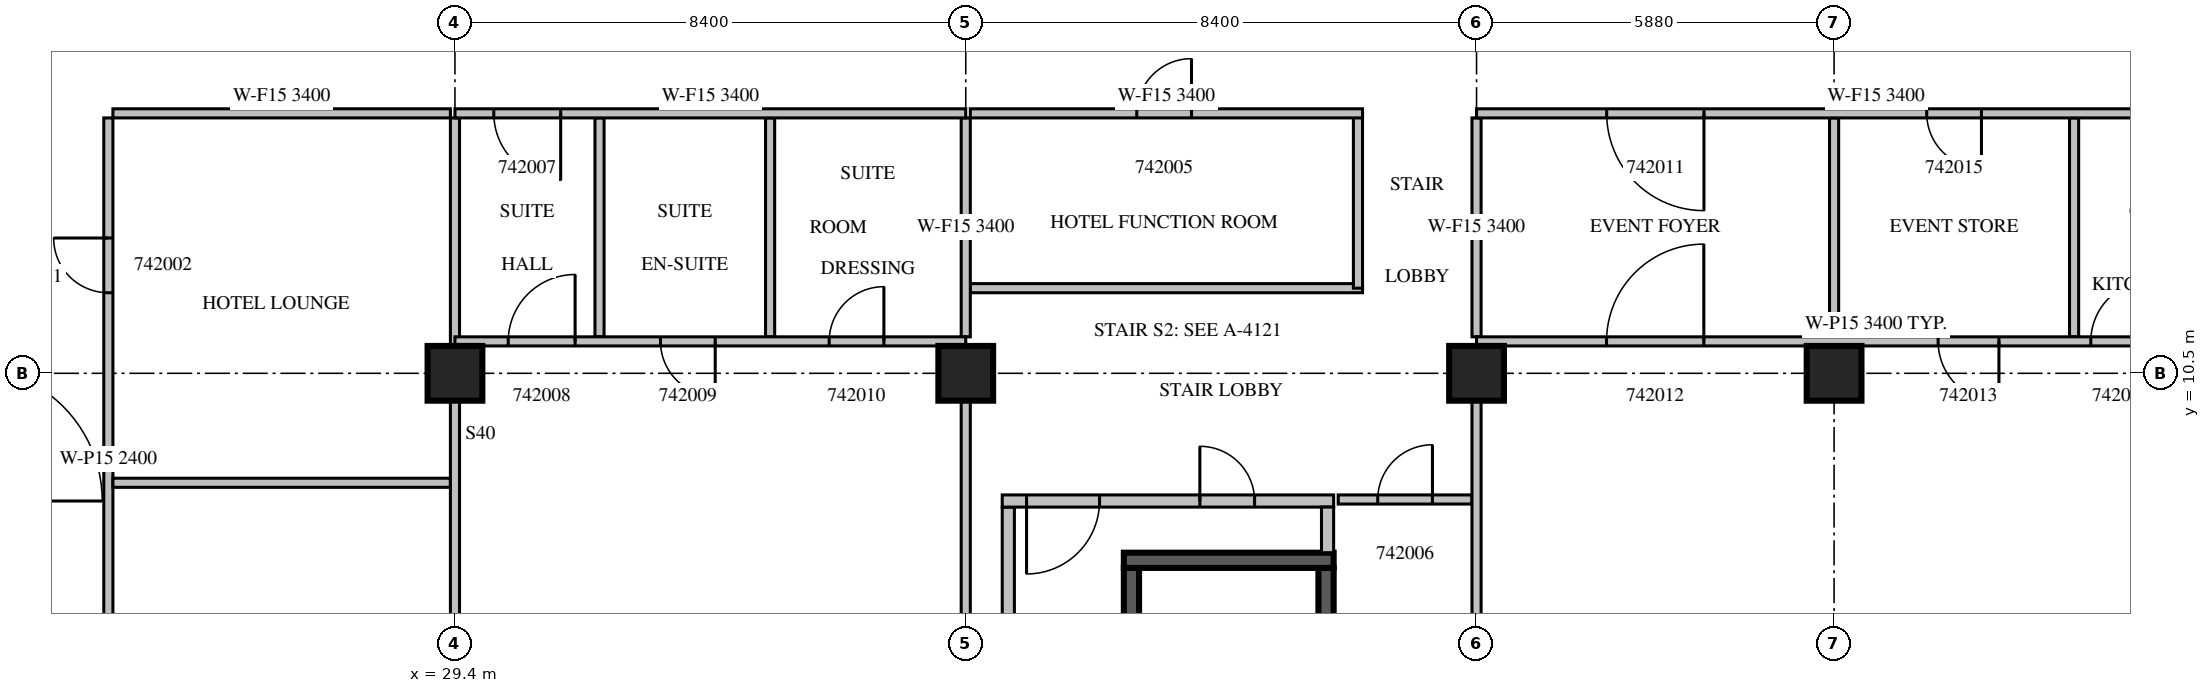
"""IFC4 building model, lengths in metres.
Left out: names, types, materials, properties, quantities, classifications, styles, units other than length and angle.
Written with IfcOpenShell. Run it as: python <this file> out.ifc"""

import sys

from ifc_helpers import new_model, si_unit, direction, frame, frame_2d, origin, origin_2d, place, context, subcontext, project, spatial, rectangle, extrude, source, transform, mapped, element, fill, save


model = new_model("IFC4")
c1 = context("Model", 3, precision=1e-05, world=origin(), true_north=direction((0.0, 1.0)))
c2 = subcontext(c1, "Body", "Model", "MODEL_VIEW")
j1 = project(units=[si_unit("LENGTHUNIT", "METRE"), si_unit("PLANEANGLEUNIT", "RADIAN")], contexts=[c1])
p1 = place(None, origin())
s1 = spatial("IfcSite", under=j1, at=p1, CompositionType="ELEMENT")
p2 = place(p1, origin())
s2 = spatial("IfcBuilding", under=s1, at=p2, CompositionType="ELEMENT")
p3 = place(p2, frame((0.0, 0.0, 193.0)))
s3 = spatial("IfcBuildingStorey", under=s2, at=p3, CompositionType="ELEMENT", Elevation=193.0)
m1 = source(origin(), c2, "Body", "SweptSolid", [
    extrude(rectangle(XDim=0.9, YDim=0.9, at=origin_2d()), origin(), (0.0, 0.0, 1.0), 3.8),
])
for number, where, z_axis, x_axis in (
    (1, (29.4, 10.5, 0.0), (0.0, 0.0, 1.0), (1.0, 0.0, 0.0)),
    (2, (37.8, 10.5, 0.0), (0.0, 0.0, 1.0), (1.0, 0.0, 0.0)),
    (3, (46.2, 10.5, 0.0), (0.0, 0.0, 1.0), (1.0, 0.0, 0.0)),
    (4, (52.08, 10.5, 0.0), (0.0, 0.0, 1.0), (1.0, 0.0, 0.0)),
):
    element("IfcColumn", number, at=place(p3, frame(where, z_axis=z_axis, x_axis=x_axis)), inside=s3, PredefinedType="COLUMN", context=c2, shape_type="MappedRepresentation", body=[
        mapped(m1, transform((0.0, 0.0, 0.0), scale=1.0)),
    ])
m2 = source(origin(), c2, "Body", "SweptSolid", [
    extrude(rectangle(XDim=7.0, YDim=0.25, at=frame_2d((3.5, 0.0))), origin(), (0.0, 0.0, 1.0), 3.4),
])
p4 = place(p3, frame((40.525, 0.3, 0.0), z_axis=(0.0, 0.0, 1.0), x_axis=(0.0, 1.0, 0.0)))
e5 = element("IfcWall", 5, at=p4, inside=s3, PredefinedType="SOLIDWALL", context=c2, shape_type="MappedRepresentation", body=[
    mapped(m2, transform((0.0, 0.0, 0.0), scale=1.0)),
])
m3 = source(origin(), c2, "Body", "SweptSolid", [
    extrude(rectangle(XDim=1.1, YDim=2.1, at=frame_2d((0.55, 1.05))), frame((0.0, 0.135, 0.0), z_axis=(0.0, -1.0, 0.0), x_axis=(1.0, 0.0, 0.0)), (0.0, 0.0, 1.0), 0.27),
])
p5 = place(p4, frame((0.55, 0.0, 0.0)))
e6 = element("IfcOpeningElement", 6, at=p5, cuts=e5, PredefinedType="OPENING", context=c2, shape_type="MappedRepresentation", body=[
    mapped(m3, transform((0.0, 0.0, 0.0), scale=1.0)),
])
p6 = place(p3, frame((43.725, 0.3, 0.0), z_axis=(0.0, 0.0, 1.0), x_axis=(0.0, 1.0, 0.0)))
e7 = element("IfcWall", 7, at=p6, inside=s3, PredefinedType="SOLIDWALL", context=c2, shape_type="MappedRepresentation", body=[
    mapped(m2, transform((0.0, 0.0, 0.0), scale=1.0)),
])
m4 = source(origin(), c2, "Body", "SweptSolid", [
    extrude(rectangle(XDim=3.45, YDim=0.25, at=frame_2d((1.725, 0.0))), origin(), (0.0, 0.0, 1.0), 3.4),
])
p7 = place(p3, frame((40.4, 7.425, 0.0), z_axis=(0.0, 0.0, 1.0), x_axis=(1.0, 0.0, 0.0)))
e8 = element("IfcWall", 8, at=p7, inside=s3, PredefinedType="SOLIDWALL", context=c2, shape_type="MappedRepresentation", body=[
    mapped(m4, transform((0.0, 0.0, 0.0), scale=1.0)),
])
m5 = source(origin(), c2, "Body", "SweptSolid", [
    extrude(rectangle(XDim=8.0, YDim=0.2, at=frame_2d((4.0, 0.0))), origin(), (0.0, 0.0, 1.0), 3.4),
])
p8 = place(p3, frame((38.5, 0.3, 0.0), z_axis=(0.0, 0.0, 1.0), x_axis=(0.0, 1.0, 0.0)))
e9 = element("IfcWall", 9, at=p8, inside=s3, PredefinedType="PARTITIONING", context=c2, shape_type="MappedRepresentation", body=[
    mapped(m5, transform((0.0, 0.0, 0.0), scale=1.0)),
])
m6 = source(origin(), c2, "Body", "SweptSolid", [
    extrude(rectangle(XDim=5.45, YDim=0.2, at=frame_2d((2.725, 0.0))), origin(), (0.0, 0.0, 1.0), 3.4),
])
p9 = place(p3, frame((38.4, 8.4, 0.0), z_axis=(0.0, 0.0, 1.0), x_axis=(1.0, 0.0, 0.0)))
e10 = element("IfcWall", 10, at=p9, inside=s3, PredefinedType="PARTITIONING", context=c2, shape_type="MappedRepresentation", body=[
    mapped(m6, transform((0.0, 0.0, 0.0), scale=1.0)),
])
m7 = source(origin(), c2, "Body", "SweptSolid", [
    extrude(rectangle(XDim=1.2, YDim=2.1, at=frame_2d((0.6, 1.05))), frame((0.0, 0.11, 0.0), z_axis=(0.0, -1.0, 0.0), x_axis=(1.0, 0.0, 0.0)), (0.0, 0.0, 1.0), 0.22),
])
p10 = place(p9, frame((0.4, 0.0, 0.0)))
e11 = element("IfcOpeningElement", 11, at=p10, cuts=e10, PredefinedType="OPENING", context=c2, shape_type="MappedRepresentation", body=[
    mapped(m7, transform((0.0, 0.0, 0.0), scale=1.0)),
])
m8 = source(origin(), c2, "Body", "SweptSolid", [
    extrude(rectangle(XDim=0.9, YDim=2.1, at=frame_2d((0.45, 1.05))), frame((0.0, 0.11, 0.0), z_axis=(0.0, -1.0, 0.0), x_axis=(1.0, 0.0, 0.0)), (0.0, 0.0, 1.0), 0.22),
])
p11 = place(p9, frame((3.25, 0.0, 0.0)))
e12 = element("IfcOpeningElement", 12, at=p11, cuts=e10, PredefinedType="OPENING", context=c2, shape_type="MappedRepresentation", body=[
    mapped(m8, transform((0.0, 0.0, 0.0), scale=1.0)),
])
m9 = source(origin(), c2, "Body", "SweptSolid", [
    extrude(rectangle(XDim=0.75, YDim=0.2, at=frame_2d((0.375, 0.0))), origin(), (0.0, 0.0, 1.0), 3.4),
])
p12 = place(p3, frame((43.75, 7.55, 0.0), z_axis=(0.0, 0.0, 1.0), x_axis=(0.0, 1.0, 0.0)))
e13 = element("IfcWall", 13, at=p12, inside=s3, PredefinedType="PARTITIONING", context=c2, shape_type="MappedRepresentation", body=[
    mapped(m9, transform((0.0, 0.0, 0.0), scale=1.0)),
])
p13 = place(p3, frame((23.7, 14.7, 0.0), z_axis=(0.0, 0.0, 1.0), x_axis=(0.0, -1.0, 0.0)))
e14 = element("IfcWall", 14, at=p13, inside=s3, PredefinedType="PARTITIONING", context=c2, shape_type="SweptSolid", body=[
    extrude(rectangle(XDim=11.225, YDim=0.15, at=frame_2d((5.612, 0.0))), origin(), (0.0, 0.0, 1.0), 2.4),
])
m10 = source(origin(), c2, "Body", "SweptSolid", [
    extrude(rectangle(XDim=0.9, YDim=2.1, at=frame_2d((0.45, 1.05))), frame((0.0, 0.085, 0.0), z_axis=(0.0, -1.0, 0.0), x_axis=(1.0, 0.0, 0.0)), (0.0, 0.0, 1.0), 0.17),
])
p14 = place(p13, frame((8.463, 0.0, 0.0)))
e15 = element("IfcOpeningElement", 15, at=p14, cuts=e14, PredefinedType="OPENING", context=c2, shape_type="MappedRepresentation", body=[
    mapped(m10, transform((0.0, 0.0, 0.0), scale=1.0)),
])
p15 = place(p13, frame((1.975, 0.0, 0.0)))
e16 = element("IfcOpeningElement", 16, at=p15, cuts=e14, PredefinedType="OPENING", context=c2, shape_type="MappedRepresentation", body=[
    mapped(m10, transform((0.0, 0.0, 0.0), scale=1.0)),
])
m11 = source(origin(), c2, "Body", "SweptSolid", [
    extrude(rectangle(XDim=5.55, YDim=0.15, at=frame_2d((2.775, 0.0))), origin(), (0.0, 0.0, 1.0), 3.4),
])
for number, where, z_axis, x_axis in (
    (17, (29.325, 8.7, 0.0), (0.0, 0.0, 1.0), (-1.0, 0.0, 0.0)),
    (18, (29.325, 14.775, 0.0), (0.0, 0.0, 1.0), (-1.0, 0.0, 0.0)),
):
    element("IfcWall", number, at=place(p3, frame(where, z_axis=z_axis, x_axis=x_axis)), inside=s3, PredefinedType="PARTITIONING", context=c2, shape_type="MappedRepresentation", body=[
        mapped(m11, transform((0.0, 0.0, 0.0), scale=1.0)),
    ])
m12 = source(origin(), c2, "Body", "SweptSolid", [
    extrude(rectangle(XDim=6.576, YDim=0.15, at=frame_2d((3.288, 0.0))), origin(), (0.0, 0.0, 1.0), 3.4),
])
p16 = place(p3, frame((29.4, 3.475, 0.0), z_axis=(0.0, 0.0, 1.0), x_axis=(0.0, 1.0, 0.0)))
e19 = element("IfcWall", 19, at=p16, inside=s3, PredefinedType="PARTITIONING", context=c2, shape_type="MappedRepresentation", body=[
    mapped(m12, transform((0.0, 0.0, 0.0), scale=1.0)),
])
p17 = place(p3, frame((29.4, 10.949, 0.0), z_axis=(0.0, 0.0, 1.0), x_axis=(0.0, 1.0, 0.0)))
e20 = element("IfcWall", 20, at=p17, inside=s3, PredefinedType="PARTITIONING", context=c2, shape_type="SweptSolid", body=[
    extrude(rectangle(XDim=3.751, YDim=0.15, at=frame_2d((1.875, 0.0))), origin(), (0.0, 0.0, 1.0), 3.4),
])
m13 = source(origin(), c2, "Body", "SweptSolid", [
    extrude(rectangle(XDim=6.45, YDim=0.15, at=frame_2d((3.225, 0.0))), origin(), (0.0, 0.0, 1.0), 3.4),
])
p18 = place(p3, frame((37.875, 11.9, 0.0), z_axis=(0.0, 0.0, 1.0), x_axis=(1.0, 0.0, 0.0)))
e21 = element("IfcWall", 21, at=p18, inside=s3, PredefinedType="PARTITIONING", context=c2, shape_type="MappedRepresentation", body=[
    mapped(m13, transform((0.0, 0.0, 0.0), scale=1.0)),
])
p19 = place(p3, frame((44.25, 11.9, 0.0), z_axis=(0.0, 0.0, 1.0), x_axis=(0.0, 1.0, 0.0)))
e22 = element("IfcWall", 22, at=p19, inside=s3, PredefinedType="PARTITIONING", context=c2, shape_type="SweptSolid", body=[
    extrude(rectangle(XDim=2.875, YDim=0.15, at=frame_2d((1.438, 0.0))), origin(), (0.0, 0.0, 1.0), 3.4),
])
p20 = place(p3, frame((44.325, 14.775, 0.0), z_axis=(0.0, 0.0, 1.0), x_axis=(-1.0, 0.0, 0.0)))
e23 = element("IfcWall", 23, at=p20, inside=s3, PredefinedType="PARTITIONING", context=c2, shape_type="MappedRepresentation", body=[
    mapped(m13, transform((0.0, 0.0, 0.0), scale=1.0)),
])
p21 = place(p20, frame((2.812, 0.0, 0.0)))
e24 = element("IfcOpeningElement", 24, at=p21, cuts=e23, PredefinedType="OPENING", context=c2, shape_type="MappedRepresentation", body=[
    mapped(m10, transform((0.0, 0.0, 0.0), scale=1.0)),
])
m14 = source(origin(), c2, "Body", "SweptSolid", [
    extrude(rectangle(XDim=2.2, YDim=0.15, at=frame_2d((1.1, 0.0))), origin(), (0.0, 0.0, 1.0), 3.4),
])
p22 = place(p3, frame((46.125, 8.425, 0.0), z_axis=(0.0, 0.0, 1.0), x_axis=(-1.0, 0.0, 0.0)))
e25 = element("IfcWall", 25, at=p22, inside=s3, PredefinedType="PARTITIONING", context=c2, shape_type="MappedRepresentation", body=[
    mapped(m14, transform((0.0, 0.0, 0.0), scale=1.0)),
])
p23 = place(p22, frame((0.65, 0.0, 0.0)))
e26 = element("IfcOpeningElement", 26, at=p23, cuts=e25, PredefinedType="OPENING", context=c2, shape_type="MappedRepresentation", body=[
    mapped(m10, transform((0.0, 0.0, 0.0), scale=1.0)),
])
m15 = source(origin(), c2, "Body", "SweptSolid", [
    extrude(rectangle(XDim=3.6, YDim=0.15, at=frame_2d((1.8, 0.0))), origin(), (0.0, 0.0, 1.0), 3.4),
])
for number, where, z_axis, x_axis in (
    (27, (31.777, 11.1, 0.0), (0.0, 0.0, 1.0), (0.0, 1.0, 0.0)),
    (28, (34.583, 11.1, 0.0), (0.0, 0.0, 1.0), (0.0, 1.0, 0.0)),
):
    element("IfcWall", number, at=place(p3, frame(where, z_axis=z_axis, x_axis=x_axis)), inside=s3, PredefinedType="PARTITIONING", context=c2, shape_type="MappedRepresentation", body=[
        mapped(m15, transform((0.0, 0.0, 0.0), scale=1.0)),
    ])
m16 = source(origin(), c2, "Body", "SweptSolid", [
    extrude(rectangle(XDim=9.152, YDim=0.15, at=frame_2d((4.576, 0.0))), origin(), (0.0, 0.0, 1.0), 3.4),
])
p24 = place(p3, frame((37.8, 0.899, 0.0), z_axis=(0.0, 0.0, 1.0), x_axis=(0.0, 1.0, 0.0)))
e29 = element("IfcWall", 29, at=p24, inside=s3, PredefinedType="PARTITIONING", context=c2, shape_type="MappedRepresentation", body=[
    mapped(m16, transform((0.0, 0.0, 0.0), scale=1.0)),
])
p25 = place(p3, frame((37.8, 11.1, 0.0), z_axis=(0.0, 0.0, 1.0), x_axis=(0.0, 1.0, 0.0)))
e30 = element("IfcWall", 30, at=p25, inside=s3, PredefinedType="PARTITIONING", context=c2, shape_type="MappedRepresentation", body=[
    mapped(m15, transform((0.0, 0.0, 0.0), scale=1.0)),
])
m17 = source(origin(), c2, "Body", "SweptSolid", [
    extrude(rectangle(XDim=8.4, YDim=0.15, at=frame_2d((4.2, 0.0))), origin(), (0.0, 0.0, 1.0), 3.4),
])
p26 = place(p3, frame((37.8, 11.025, 0.0), z_axis=(0.0, 0.0, 1.0), x_axis=(-1.0, 0.0, 0.0)))
e31 = element("IfcWall", 31, at=p26, inside=s3, PredefinedType="PARTITIONING", context=c2, shape_type="MappedRepresentation", body=[
    mapped(m17, transform((0.0, 0.0, 0.0), scale=1.0)),
])
m18 = source(origin(), c2, "Body", "SweptSolid", [
    extrude(rectangle(XDim=1.1, YDim=2.1, at=frame_2d((0.55, 1.05))), frame((0.0, 0.085, 0.0), z_axis=(0.0, -1.0, 0.0), x_axis=(1.0, 0.0, 0.0)), (0.0, 0.0, 1.0), 0.17),
])
p27 = place(p26, frame((6.424, 0.0, 0.0)))
e32 = element("IfcOpeningElement", 32, at=p27, cuts=e31, PredefinedType="OPENING", context=c2, shape_type="MappedRepresentation", body=[
    mapped(m18, transform((0.0, 0.0, 0.0), scale=1.0)),
])
p28 = place(p26, frame((4.12, 0.0, 0.0)))
e33 = element("IfcOpeningElement", 33, at=p28, cuts=e31, PredefinedType="OPENING", context=c2, shape_type="MappedRepresentation", body=[
    mapped(m10, transform((0.0, 0.0, 0.0), scale=1.0)),
])
p29 = place(p26, frame((1.346, 0.0, 0.0)))
e34 = element("IfcOpeningElement", 34, at=p29, cuts=e31, PredefinedType="OPENING", context=c2, shape_type="MappedRepresentation", body=[
    mapped(m10, transform((0.0, 0.0, 0.0), scale=1.0)),
])
for number, where, z_axis, x_axis in (
    (35, (52.08, 11.1, 0.0), (0.0, 0.0, 1.0), (0.0, 1.0, 0.0)),
    (36, (56.027, 11.1, 0.0), (0.0, 0.0, 1.0), (0.0, 1.0, 0.0)),
):
    element("IfcWall", number, at=place(p3, frame(where, z_axis=z_axis, x_axis=x_axis)), inside=s3, PredefinedType="PARTITIONING", context=c2, shape_type="MappedRepresentation", body=[
        mapped(m15, transform((0.0, 0.0, 0.0), scale=1.0)),
    ])
p30 = place(p3, frame((46.2, 0.899, 0.0), z_axis=(0.0, 0.0, 1.0), x_axis=(0.0, 1.0, 0.0)))
e37 = element("IfcWall", 37, at=p30, inside=s3, PredefinedType="PARTITIONING", context=c2, shape_type="MappedRepresentation", body=[
    mapped(m16, transform((0.0, 0.0, 0.0), scale=1.0)),
])
p31 = place(p3, frame((46.2, 11.1, 0.0), z_axis=(0.0, 0.0, 1.0), x_axis=(0.0, 1.0, 0.0)))
e38 = element("IfcWall", 38, at=p31, inside=s3, PredefinedType="PARTITIONING", context=c2, shape_type="MappedRepresentation", body=[
    mapped(m15, transform((0.0, 0.0, 0.0), scale=1.0)),
])
m19 = source(origin(), c2, "Body", "SweptSolid", [
    extrude(rectangle(XDim=13.14, YDim=0.15, at=frame_2d((6.57, 0.0))), origin(), (0.0, 0.0, 1.0), 3.4),
])
p32 = place(p3, frame((59.34, 11.025, 0.0), z_axis=(0.0, 0.0, 1.0), x_axis=(-1.0, 0.0, 0.0)))
e39 = element("IfcWall", 39, at=p32, inside=s3, PredefinedType="PARTITIONING", context=c2, shape_type="MappedRepresentation", body=[
    mapped(m19, transform((0.0, 0.0, 0.0), scale=1.0)),
])
m20 = source(origin(), c2, "Body", "SweptSolid", [
    extrude(rectangle(XDim=1.6, YDim=2.1, at=frame_2d((0.8, 1.05))), frame((0.0, 0.085, 0.0), z_axis=(0.0, -1.0, 0.0), x_axis=(1.0, 0.0, 0.0)), (0.0, 0.0, 1.0), 0.17),
])
p33 = place(p32, frame((9.402, 0.0, 0.0)))
e40 = element("IfcOpeningElement", 40, at=p33, cuts=e39, PredefinedType="OPENING", context=c2, shape_type="MappedRepresentation", body=[
    mapped(m20, transform((0.0, 0.0, 0.0), scale=1.0)),
])
m21 = source(origin(), c2, "Body", "SweptSolid", [
    extrude(rectangle(XDim=1.0, YDim=2.1, at=frame_2d((0.5, 1.05))), frame((0.0, 0.085, 0.0), z_axis=(0.0, -1.0, 0.0), x_axis=(1.0, 0.0, 0.0)), (0.0, 0.0, 1.0), 0.17),
])
p34 = place(p32, frame((4.549, 0.0, 0.0)))
e41 = element("IfcOpeningElement", 41, at=p34, cuts=e39, PredefinedType="OPENING", context=c2, shape_type="MappedRepresentation", body=[
    mapped(m21, transform((0.0, 0.0, 0.0), scale=1.0)),
])
p35 = place(p32, frame((2.038, 0.0, 0.0)))
e42 = element("IfcOpeningElement", 42, at=p35, cuts=e39, PredefinedType="OPENING", context=c2, shape_type="MappedRepresentation", body=[
    mapped(m21, transform((0.0, 0.0, 0.0), scale=1.0)),
])
p36 = place(p3, frame((37.8, 14.775, 0.0), z_axis=(0.0, 0.0, 1.0), x_axis=(-1.0, 0.0, 0.0)))
e43 = element("IfcWall", 43, at=p36, inside=s3, PredefinedType="PARTITIONING", context=c2, shape_type="MappedRepresentation", body=[
    mapped(m17, transform((0.0, 0.0, 0.0), scale=1.0)),
])
p37 = place(p36, frame((6.662, 0.0, 0.0)))
e44 = element("IfcOpeningElement", 44, at=p37, cuts=e43, PredefinedType="OPENING", context=c2, shape_type="MappedRepresentation", body=[
    mapped(m18, transform((0.0, 0.0, 0.0), scale=1.0)),
])
p38 = place(p3, frame((59.34, 14.775, 0.0), z_axis=(0.0, 0.0, 1.0), x_axis=(-1.0, 0.0, 0.0)))
e45 = element("IfcWall", 45, at=p38, inside=s3, PredefinedType="PARTITIONING", context=c2, shape_type="MappedRepresentation", body=[
    mapped(m19, transform((0.0, 0.0, 0.0), scale=1.0)),
])
p39 = place(p38, frame((9.4, 0.0, 0.0)))
e46 = element("IfcOpeningElement", 46, at=p39, cuts=e45, PredefinedType="OPENING", context=c2, shape_type="MappedRepresentation", body=[
    mapped(m20, transform((0.0, 0.0, 0.0), scale=1.0)),
])
p40 = place(p38, frame((4.837, 0.0, 0.0)))
e47 = element("IfcOpeningElement", 47, at=p40, cuts=e45, PredefinedType="OPENING", context=c2, shape_type="MappedRepresentation", body=[
    mapped(m10, transform((0.0, 0.0, 0.0), scale=1.0)),
])
m22 = source(origin(), c2, "Body", "SweptSolid", [
    extrude(rectangle(XDim=1.2, YDim=2.1, at=frame_2d((0.6, 1.05))), frame((0.0, 0.025, 0.0), z_axis=(0.0, -1.0, 0.0), x_axis=(1.0, 0.0, 0.0)), (0.0, 0.0, 1.0), 0.05),
])
p41 = place(p10, origin())
e48 = element("IfcDoor", 48, at=p41, inside=s3, OperationType="SINGLE_SWING_RIGHT", PredefinedType="DOOR", context=c2, shape_type="MappedRepresentation", body=[
    mapped(m22, transform((0.0, 0.0, 0.0), scale=1.0)),
])
fill(e11, e48)
m23 = source(origin(), c2, "Body", "SweptSolid", [
    extrude(rectangle(XDim=0.9, YDim=2.1, at=frame_2d((0.45, 1.05))), frame((0.0, 0.025, 0.0), z_axis=(0.0, -1.0, 0.0), x_axis=(1.0, 0.0, 0.0)), (0.0, 0.0, 1.0), 0.05),
])
p42 = place(p11, origin())
e49 = element("IfcDoor", 49, at=p42, inside=s3, OperationType="SINGLE_SWING_LEFT", PredefinedType="DOOR", context=c2, shape_type="MappedRepresentation", body=[
    mapped(m23, transform((0.0, 0.0, 0.0), scale=1.0)),
])
fill(e12, e49)
p43 = place(p15, origin())
e50 = element("IfcDoor", 50, at=p43, inside=s3, OperationType="SINGLE_SWING_RIGHT", PredefinedType="DOOR", context=c2, shape_type="MappedRepresentation", body=[
    mapped(m23, transform((0.0, 0.0, 0.0), scale=1.0)),
])
fill(e16, e50)
p44 = place(p21, origin())
e51 = element("IfcDoor", 51, at=p44, inside=s3, OperationType="SINGLE_SWING_RIGHT", PredefinedType="DOOR", context=c2, shape_type="MappedRepresentation", body=[
    mapped(m23, transform((0.0, 0.0, 0.0), scale=1.0)),
])
fill(e24, e51)
p45 = place(p23, origin())
e52 = element("IfcDoor", 52, at=p45, inside=s3, OperationType="SINGLE_SWING_RIGHT", PredefinedType="DOOR", context=c2, shape_type="MappedRepresentation", body=[
    mapped(m23, transform((0.0, 0.0, 0.0), scale=1.0)),
])
fill(e26, e52)
m24 = source(origin(), c2, "Body", "SweptSolid", [
    extrude(rectangle(XDim=1.1, YDim=2.1, at=frame_2d((0.55, 1.05))), frame((0.0, 0.025, 0.0), z_axis=(0.0, -1.0, 0.0), x_axis=(1.0, 0.0, 0.0)), (0.0, 0.0, 1.0), 0.05),
])
p46 = place(p37, origin())
e53 = element("IfcDoor", 53, at=p46, inside=s3, OperationType="SINGLE_SWING_LEFT", PredefinedType="DOOR", context=c2, shape_type="MappedRepresentation", body=[
    mapped(m24, transform((0.0, 0.0, 0.0), scale=1.0)),
])
fill(e44, e53)
p47 = place(p27, origin())
e54 = element("IfcDoor", 54, at=p47, inside=s3, OperationType="SINGLE_SWING_RIGHT", PredefinedType="DOOR", context=c2, shape_type="MappedRepresentation", body=[
    mapped(m24, transform((0.0, 0.0, 0.0), scale=1.0)),
])
fill(e32, e54)
p48 = place(p28, origin())
e55 = element("IfcDoor", 55, at=p48, inside=s3, OperationType="SINGLE_SWING_LEFT", PredefinedType="DOOR", context=c2, shape_type="MappedRepresentation", body=[
    mapped(m23, transform((0.0, 0.0, 0.0), scale=1.0)),
])
fill(e33, e55)
p49 = place(p29, origin())
e56 = element("IfcDoor", 56, at=p49, inside=s3, OperationType="SINGLE_SWING_RIGHT", PredefinedType="DOOR", context=c2, shape_type="MappedRepresentation", body=[
    mapped(m23, transform((0.0, 0.0, 0.0), scale=1.0)),
])
fill(e34, e56)
m25 = source(origin(), c2, "Body", "SweptSolid", [
    extrude(rectangle(XDim=1.6, YDim=2.1, at=frame_2d((0.8, 1.05))), frame((0.0, 0.025, 0.0), z_axis=(0.0, -1.0, 0.0), x_axis=(1.0, 0.0, 0.0)), (0.0, 0.0, 1.0), 0.05),
])
p50 = place(p39, origin())
e57 = element("IfcDoor", 57, at=p50, inside=s3, OperationType="SINGLE_SWING_LEFT", PredefinedType="DOOR", context=c2, shape_type="MappedRepresentation", body=[
    mapped(m25, transform((0.0, 0.0, 0.0), scale=1.0)),
])
fill(e46, e57)
p51 = place(p33, origin())
e58 = element("IfcDoor", 58, at=p51, inside=s3, OperationType="SINGLE_SWING_RIGHT", PredefinedType="DOOR", context=c2, shape_type="MappedRepresentation", body=[
    mapped(m25, transform((0.0, 0.0, 0.0), scale=1.0)),
])
fill(e40, e58)
m26 = source(origin(), c2, "Body", "SweptSolid", [
    extrude(rectangle(XDim=1.0, YDim=2.1, at=frame_2d((0.5, 1.05))), frame((0.0, 0.025, 0.0), z_axis=(0.0, -1.0, 0.0), x_axis=(1.0, 0.0, 0.0)), (0.0, 0.0, 1.0), 0.05),
])
p52 = place(p34, origin())
e59 = element("IfcDoor", 59, at=p52, inside=s3, OperationType="SINGLE_SWING_LEFT", PredefinedType="DOOR", context=c2, shape_type="MappedRepresentation", body=[
    mapped(m26, transform((0.0, 0.0, 0.0), scale=1.0)),
])
fill(e41, e59)
p53 = place(p35, origin())
e60 = element("IfcDoor", 60, at=p53, inside=s3, OperationType="SINGLE_SWING_RIGHT", PredefinedType="DOOR", context=c2, shape_type="MappedRepresentation", body=[
    mapped(m26, transform((0.0, 0.0, 0.0), scale=1.0)),
])
fill(e42, e60)
p54 = place(p40, origin())
e61 = element("IfcDoor", 61, at=p54, inside=s3, OperationType="SINGLE_SWING_LEFT", PredefinedType="DOOR", context=c2, shape_type="MappedRepresentation", body=[
    mapped(m23, transform((0.0, 0.0, 0.0), scale=1.0)),
])
fill(e47, e61)
save(model, sys.argv[1])
